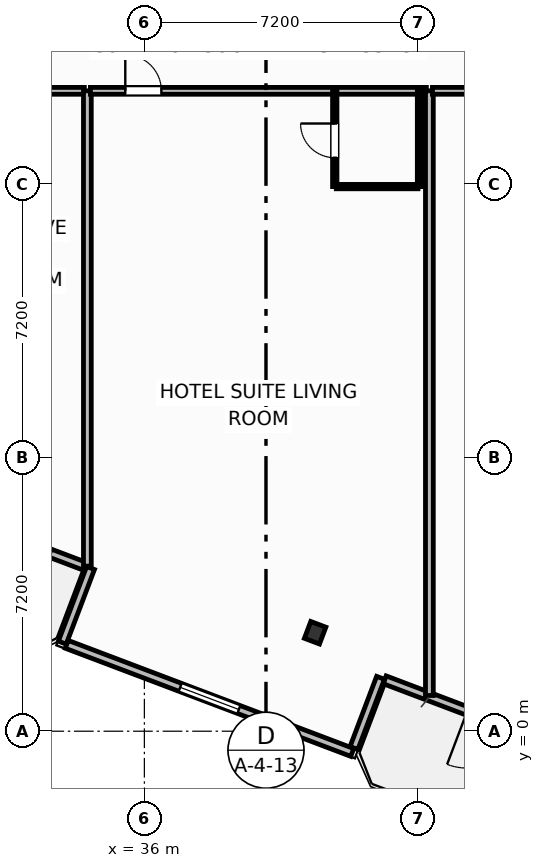
"""IFC4 building model, lengths in metres.
Left out: names, types, materials, properties, quantities, classifications, styles, units other than length and angle.
Written with IfcOpenShell. Run it as: python <this file> out.ifc"""

import sys

from ifc_helpers import new_model, si_unit, direction, frame, frame_2d, origin, origin_2d, place, context, subcontext, project, spatial, rectangle, i_section, extrude, element, fill, save


model = new_model("IFC4")
c1 = context("Model", 3, precision=1e-05, world=origin(), true_north=direction((0.0, 1.0)))
c2 = subcontext(c1, "Body", "Model", "MODEL_VIEW")
j1 = project(units=[si_unit("LENGTHUNIT", "METRE"), si_unit("PLANEANGLEUNIT", "RADIAN")], contexts=[c1])
p1 = place(None, origin())
s1 = spatial("IfcSite", under=j1, at=p1, CompositionType="ELEMENT")
p2 = place(p1, origin())
s2 = spatial("IfcBuilding", under=s1, at=p2, CompositionType="ELEMENT")
p3 = place(p2, frame((0.0, 0.0, 79.9)))
s3 = spatial("IfcBuildingStorey", under=s2, at=p3, CompositionType="ELEMENT", Elevation=79.9)
p4 = place(p3, frame((40.493, 2.591, 0.0), z_axis=(0.0, 0.0, 1.0), x_axis=(0.935221751401, -0.354062530786, 0.0)))
e1 = element("IfcColumn", 1, at=p4, inside=s3, PredefinedType="COLUMN", context=c2, shape_type="SweptSolid", body=[
    extrude(i_section(OverallWidth=0.424, OverallDepth=0.474, WebThickness=0.048, FlangeThickness=0.077, FilletRadius=0.025, at=origin_2d()), origin(), (0.0, 0.0, 1.0), 3.7),
])
p5 = place(p3, frame((34.468, 4.327, 0.0), z_axis=(0.0, 0.0, 1.0), x_axis=(-0.9352192676, 0.354069091436, 0.0)))
e2 = element("IfcWall", 2, at=p5, inside=s3, PredefinedType="SOLIDWALL", context=c2, shape_type="SweptSolid", body=[
    extrude(rectangle(XDim=6.0, YDim=0.22, at=frame_2d((3.0, 0.0))), origin(), (0.0, 0.0, 1.0), 2.73),
])
p6 = place(p5, frame((0.992, 0.0, 0.0)))
e3 = element("IfcOpeningElement", 3, at=p6, cuts=e2, PredefinedType="OPENING", context=c2, shape_type="SweptSolid", body=[
    extrude(rectangle(XDim=1.5, YDim=2.25, at=frame_2d((0.75, 1.125))), frame((0.0, 0.12, 0.0), z_axis=(0.0, -1.0, 0.0), x_axis=(1.0, 0.0, 0.0)), (0.0, 0.0, 1.0), 0.24),
])
p7 = place(p3, frame((47.935, -0.771, 0.0), z_axis=(0.0, 0.0, 1.0), x_axis=(-0.935227640088, 0.354046976001, 0.0)))
e4 = element("IfcWall", 4, at=p7, inside=s3, PredefinedType="SOLIDWALL", context=c2, shape_type="SweptSolid", body=[
    extrude(rectangle(XDim=6.0, YDim=0.22, at=frame_2d((3.0, 0.0))), origin(), (0.0, 0.0, 1.0), 2.73),
])
p8 = place(p7, frame((2.176, 0.0, 0.0)))
e5 = element("IfcOpeningElement", 5, at=p8, cuts=e4, PredefinedType="OPENING", context=c2, shape_type="SweptSolid", body=[
    extrude(rectangle(XDim=1.5, YDim=2.25, at=frame_2d((0.75, 1.125))), frame((0.0, 0.12, 0.0), z_axis=(0.0, -1.0, 0.0), x_axis=(1.0, 0.0, 0.0)), (0.0, 0.0, 1.0), 0.24),
])
p9 = place(p3, frame((34.583, 4.294, 0.0), z_axis=(0.0, 0.0, 1.0), x_axis=(-0.354128469405, -0.935196785258, 0.0)))
e6 = element("IfcWall", 6, at=p9, inside=s3, PredefinedType="SOLIDWALL", context=c2, shape_type="SweptSolid", body=[
    extrude(rectangle(XDim=2.1, YDim=0.22, at=frame_2d((1.05, 0.0))), origin(), (0.0, 0.0, 1.0), 2.73),
])
p10 = place(p3, frame((33.957, 2.286, 0.0), z_axis=(0.0, 0.0, 1.0), x_axis=(0.935220736163, -0.354065212427, 0.0)))
e7 = element("IfcWall", 7, at=p10, inside=s3, PredefinedType="SOLIDWALL", context=c2, shape_type="SweptSolid", body=[
    extrude(rectangle(XDim=8.035, YDim=0.22, at=frame_2d((4.018, 0.0))), origin(), (0.0, 0.0, 1.0), 2.73),
])
p11 = place(p10, frame((3.192, 0.0, 0.8)))
e8 = element("IfcOpeningElement", 8, at=p11, cuts=e7, PredefinedType="OPENING", context=c2, shape_type="SweptSolid", body=[
    extrude(rectangle(XDim=1.65, YDim=1.65, at=frame_2d((0.825, 0.825))), frame((0.0, 0.12, 0.0), z_axis=(0.0, -1.0, 0.0), x_axis=(1.0, 0.0, 0.0)), (0.0, 0.0, 1.0), 0.24),
])
p12 = place(p3, frame((41.516, -0.442, 0.0), z_axis=(0.0, 0.0, 1.0), x_axis=(0.354061611705, 0.935222099352, 0.0)))
e9 = element("IfcWall", 9, at=p12, inside=s3, PredefinedType="SOLIDWALL", context=c2, shape_type="SweptSolid", body=[
    extrude(rectangle(XDim=1.975, YDim=0.22, at=frame_2d((0.987, 0.0))), origin(), (0.0, 0.0, 1.0), 2.73),
])
p13 = place(p3, frame((25.58, 16.85, 0.0), z_axis=(0.0, 0.0, 1.0), x_axis=(1.0, 0.0, 0.0)))
e10 = element("IfcWall", 10, at=p13, inside=s3, PredefinedType="PARTITIONING", context=c2, shape_type="SweptSolid", body=[
    extrude(rectangle(XDim=8.84, YDim=0.18, at=frame_2d((4.42, 0.0))), origin(), (0.0, 0.0, 1.0), 3.45),
])
p14 = place(p13, frame((3.23, 0.0, 0.0)))
e11 = element("IfcOpeningElement", 11, at=p14, cuts=e10, PredefinedType="OPENING", context=c2, shape_type="SweptSolid", body=[
    extrude(rectangle(XDim=0.95, YDim=2.15, at=frame_2d((0.475, 1.075))), frame((0.0, 0.1, 0.0), z_axis=(0.0, -1.0, 0.0), x_axis=(1.0, 0.0, 0.0)), (0.0, 0.0, 1.0), 0.2),
])
p15 = place(p3, frame((34.5, 4.344, 0.0), z_axis=(0.0, 0.0, 1.0), x_axis=(0.0, 1.0, 0.0)))
e12 = element("IfcWall", 12, at=p15, inside=s3, PredefinedType="PARTITIONING", context=c2, shape_type="SweptSolid", body=[
    extrude(rectangle(XDim=12.506, YDim=0.205, at=frame_2d((6.253, 0.0))), origin(), (0.0, 0.0, 1.0), 3.45),
])
p16 = place(p3, frame((34.58, 16.85, 0.0), z_axis=(0.0, 0.0, 1.0), x_axis=(1.0, 0.0, 0.0)))
e13 = element("IfcWall", 13, at=p16, inside=s3, PredefinedType="PARTITIONING", context=c2, shape_type="SweptSolid", body=[
    extrude(rectangle(XDim=8.84, YDim=0.18, at=frame_2d((4.42, 0.0))), origin(), (0.0, 0.0, 1.0), 3.45),
])
p17 = place(p16, frame((0.918, 0.0, 0.0)))
e14 = element("IfcOpeningElement", 14, at=p17, cuts=e13, PredefinedType="OPENING", context=c2, shape_type="SweptSolid", body=[
    extrude(rectangle(XDim=0.95, YDim=2.15, at=frame_2d((0.475, 1.075))), frame((0.0, 0.1, 0.0), z_axis=(0.0, -1.0, 0.0), x_axis=(1.0, 0.0, 0.0)), (0.0, 0.0, 1.0), 0.2),
])
p18 = place(p3, frame((41.05, 14.33, 0.0), z_axis=(0.0, 0.0, 1.0), x_axis=(1.0, 0.0, 0.0)))
e15 = element("IfcWall", 15, at=p18, inside=s3, PredefinedType="PARTITIONING", context=c2, shape_type="SweptSolid", body=[
    extrude(rectangle(XDim=2.15, YDim=0.115, at=frame_2d((1.075, 0.0))), origin(), (0.0, 0.0, 1.0), 3.45),
])
p19 = place(p3, frame((41.01, 14.33, 0.0), z_axis=(0.0, 0.0, 1.0), x_axis=(0.0, 1.0, 0.0)))
e16 = element("IfcWall", 16, at=p19, inside=s3, PredefinedType="PARTITIONING", context=c2, shape_type="SweptSolid", body=[
    extrude(rectangle(XDim=2.52, YDim=0.115, at=frame_2d((1.26, 0.0))), origin(), (0.0, 0.0, 1.0), 3.45),
])
p20 = place(p19, frame((0.76, 0.0, 0.0)))
e17 = element("IfcOpeningElement", 17, at=p20, cuts=e16, PredefinedType="OPENING", context=c2, shape_type="SweptSolid", body=[
    extrude(rectangle(XDim=0.9, YDim=2.05, at=frame_2d((0.45, 1.025))), frame((0.0, 0.067, 0.0), z_axis=(0.0, -1.0, 0.0), x_axis=(1.0, 0.0, 0.0)), (0.0, 0.0, 1.0), 0.135),
])
p21 = place(p3, frame((43.24, 14.33, 0.0), z_axis=(0.0, 0.0, 1.0), x_axis=(0.0, 1.0, 0.0)))
e18 = element("IfcWall", 18, at=p21, inside=s3, PredefinedType="PARTITIONING", context=c2, shape_type="SweptSolid", body=[
    extrude(rectangle(XDim=2.52, YDim=0.115, at=frame_2d((1.26, 0.0))), origin(), (0.0, 0.0, 1.0), 2.58),
])
p22 = place(p3, frame((43.5, 0.939, 0.0), z_axis=(0.0, 0.0, 1.0), x_axis=(0.0, 1.0, 0.0)))
e19 = element("IfcWall", 19, at=p22, inside=s3, PredefinedType="PARTITIONING", context=c2, shape_type="SweptSolid", body=[
    extrude(rectangle(XDim=15.911, YDim=0.205, at=frame_2d((7.955, 0.0))), origin(), (0.0, 0.0, 1.0), 2.58),
])
p23 = place(p3, frame((43.58, 16.85, 0.0), z_axis=(0.0, 0.0, 1.0), x_axis=(1.0, 0.0, 0.0)))
e20 = element("IfcWall", 20, at=p23, inside=s3, PredefinedType="PARTITIONING", context=c2, shape_type="SweptSolid", body=[
    extrude(rectangle(XDim=8.84, YDim=0.18, at=frame_2d((4.42, 0.0))), origin(), (0.0, 0.0, 1.0), 3.45),
])
p24 = place(p23, frame((0.918, 0.0, 0.0)))
e21 = element("IfcOpeningElement", 21, at=p24, cuts=e20, PredefinedType="OPENING", context=c2, shape_type="SweptSolid", body=[
    extrude(rectangle(XDim=0.95, YDim=2.15, at=frame_2d((0.475, 1.075))), frame((0.0, 0.1, 0.0), z_axis=(0.0, -1.0, 0.0), x_axis=(1.0, 0.0, 0.0)), (0.0, 0.0, 1.0), 0.2),
])
p25 = place(p11, origin())
e22 = element("IfcWindow", 22, at=p25, inside=s3, PartitioningType="SINGLE_PANEL", PredefinedType="WINDOW", context=c2, shape_type="SweptSolid", body=[
    extrude(rectangle(XDim=1.65, YDim=1.65, at=frame_2d((0.825, 0.825))), frame((0.0, 0.03, 0.0), z_axis=(0.0, -1.0, 0.0), x_axis=(1.0, 0.0, 0.0)), (0.0, 0.0, 1.0), 0.06),
])
fill(e8, e22)
p26 = place(p17, origin())
e23 = element("IfcDoor", 23, at=p26, inside=s3, OperationType="SINGLE_SWING_LEFT", PredefinedType="DOOR", context=c2, shape_type="SweptSolid", body=[
    extrude(rectangle(XDim=0.95, YDim=2.15, at=frame_2d((0.475, 1.075))), frame((0.0, 0.025, 0.0), z_axis=(0.0, -1.0, 0.0), x_axis=(1.0, 0.0, 0.0)), (0.0, 0.0, 1.0), 0.05),
])
fill(e14, e23)
p27 = place(p20, origin())
e24 = element("IfcDoor", 24, at=p27, inside=s3, OperationType="SINGLE_SWING_RIGHT", PredefinedType="DOOR", context=c2, shape_type="SweptSolid", body=[
    extrude(rectangle(XDim=0.9, YDim=2.05, at=frame_2d((0.45, 1.025))), frame((0.0, 0.025, 0.0), z_axis=(0.0, -1.0, 0.0), x_axis=(1.0, 0.0, 0.0)), (0.0, 0.0, 1.0), 0.05),
])
fill(e17, e24)
save(model, sys.argv[1])
